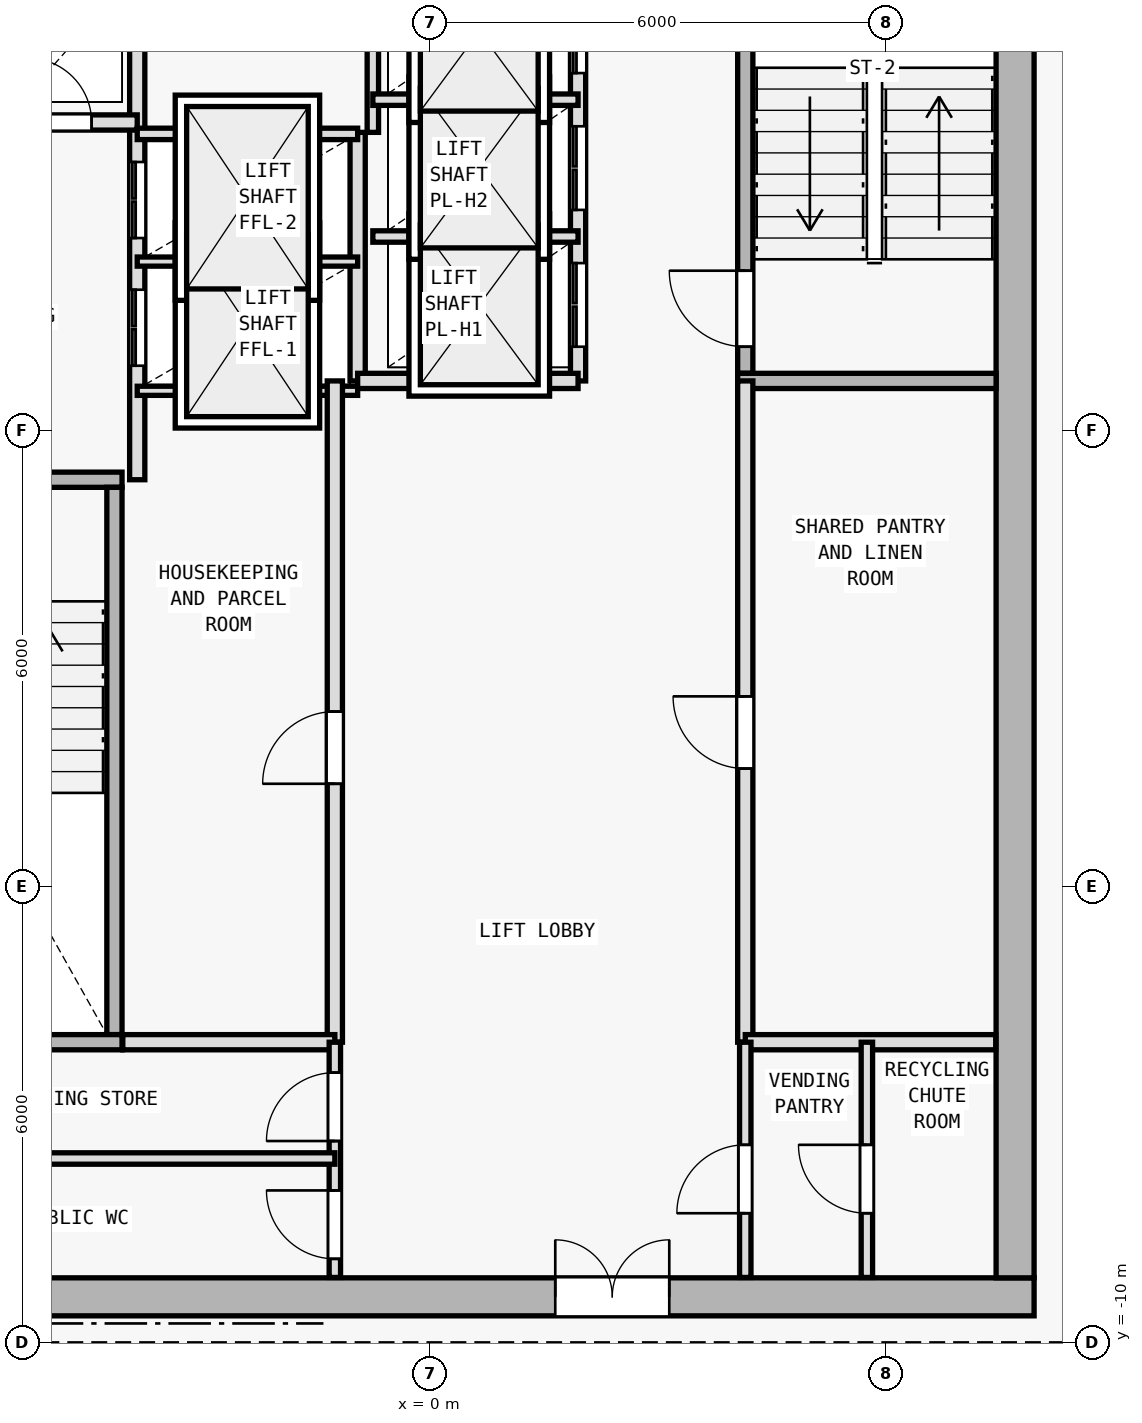
"""IFC4 building model, lengths in metres.
Left out: names, types, materials, properties, quantities, classifications, styles, units other than length and angle.
Written with IfcOpenShell. Run it as: python <this file> out.ifc"""

import sys

from ifc_helpers import new_model, si_unit, direction, frame, frame_2d, origin, origin_2d, place, context, subcontext, project, spatial, rectangle, i_section, extrude, element, fill, save


model = new_model("IFC4")
c1 = context("Model", 3, precision=1e-05, world=origin(), true_north=direction((0.0, 1.0)))
c2 = subcontext(c1, "Body", "Model", "MODEL_VIEW")
j1 = project(units=[si_unit("LENGTHUNIT", "METRE"), si_unit("PLANEANGLEUNIT", "RADIAN")], contexts=[c1])
p1 = place(None, origin())
s1 = spatial("IfcSite", under=j1, at=p1, CompositionType="ELEMENT")
p2 = place(p1, origin())
s2 = spatial("IfcBuilding", under=s1, at=p2, CompositionType="ELEMENT")
p3 = place(p2, frame((0.0, 0.0, 234.3)))
s3 = spatial("IfcBuildingStorey", under=s2, at=p3, CompositionType="ELEMENT", Elevation=234.3)
for number, where, z_axis, x_axis in (
    (1, (7.7, -9.4, 0.0), (0.0, 0.0, 1.0), (1.0, 0.0, 0.0)),
    (2, (0.0, -9.4, 0.0), (0.0, 0.0, 1.0), (1.0, 0.0, 0.0)),
    (3, (7.7, 0.4, 0.0), (0.0, 0.0, 1.0), (1.0, 0.0, 0.0)),
):
    element("IfcColumn", number, at=place(p3, frame(where, z_axis=z_axis, x_axis=x_axis)), inside=s3, PredefinedType="COLUMN", context=c2, shape_type="SweptSolid", body=[
        extrude(i_section(OverallWidth=0.398, OverallDepth=0.387, WebThickness=0.013, FlangeThickness=0.022, FilletRadius=0.015, at=origin_2d()), origin(), (0.0, 0.0, 1.0), 3.6),
    ])
p4 = place(p3, frame((-7.95, -9.4, 0.0), z_axis=(0.0, 0.0, 1.0), x_axis=(1.0, 0.0, 0.0)))
e4 = element("IfcWall", 4, at=p4, inside=s3, PredefinedType="SHEAR", context=c2, shape_type="SweptSolid", body=[
    extrude(rectangle(XDim=15.9, YDim=0.5, at=frame_2d((7.95, 0.0))), origin(), (0.0, 0.0, 1.0), 3.35),
])
p5 = place(p4, frame((9.6, 0.0, 0.0)))
e5 = element("IfcOpeningElement", 5, at=p5, cuts=e4, PredefinedType="OPENING", context=c2, shape_type="SweptSolid", body=[
    extrude(rectangle(XDim=1.5, YDim=2.2, at=frame_2d((0.75, 1.1))), frame((0.0, 0.26, 0.0), z_axis=(0.0, -1.0, 0.0), x_axis=(1.0, 0.0, 0.0)), (0.0, 0.0, 1.0), 0.52),
])
p6 = place(p3, frame((7.7, 9.95, 0.0), z_axis=(0.0, 0.0, 1.0), x_axis=(0.0, -1.0, 0.0)))
e6 = element("IfcWall", 6, at=p6, inside=s3, PredefinedType="SHEAR", context=c2, shape_type="SweptSolid", body=[
    extrude(rectangle(XDim=19.1, YDim=0.5, at=frame_2d((9.55, 0.0))), origin(), (0.0, 0.0, 1.0), 3.35),
])
p7 = place(p3, frame((-7.45, 1.35, 0.0), z_axis=(0.0, 0.0, 1.0), x_axis=(1.0, 0.0, 0.0)))
e7 = element("IfcWall", 7, at=p7, inside=s3, PredefinedType="SOLIDWALL", context=c2, shape_type="SweptSolid", body=[
    extrude(rectangle(XDim=3.4, YDim=0.2, at=frame_2d((1.7, 0.0))), origin(), (0.0, 0.0, 1.0), 3.35),
])
p8 = place(p7, frame((0.65, 0.0, 0.0)))
e8 = element("IfcOpeningElement", 8, at=p8, cuts=e7, PredefinedType="OPENING", context=c2, shape_type="SweptSolid", body=[
    extrude(rectangle(XDim=1.0, YDim=2.15, at=frame_2d((0.5, 1.075))), frame((0.0, 0.11, 0.0), z_axis=(0.0, -1.0, 0.0), x_axis=(1.0, 0.0, 0.0)), (0.0, 0.0, 1.0), 0.22),
])
p9 = place(p3, frame((-4.15, -5.95, 0.0), z_axis=(0.0, 0.0, 1.0), x_axis=(0.0, 1.0, 0.0)))
e9 = element("IfcWall", 9, at=p9, inside=s3, PredefinedType="SOLIDWALL", context=c2, shape_type="SweptSolid", body=[
    extrude(rectangle(XDim=7.2, YDim=0.2, at=frame_2d((3.6, 0.0))), origin(), (0.0, 0.0, 1.0), 3.35),
])
p10 = place(p3, frame((-3.85, 1.35, 0.0), z_axis=(0.0, 0.0, 1.0), x_axis=(0.0, 1.0, 0.0)))
e10 = element("IfcWall", 10, at=p10, inside=s3, PredefinedType="SOLIDWALL", context=c2, shape_type="SweptSolid", body=[
    extrude(rectangle(XDim=8.595, YDim=0.2, at=frame_2d((4.297, 0.0))), origin(), (0.0, 0.0, 1.0), 3.35),
])
p11 = place(p10, frame((1.5, 0.0, 0.0)))
e11 = element("IfcOpeningElement", 11, at=p11, cuts=e10, PredefinedType="OPENING", context=c2, shape_type="SweptSolid", body=[
    extrude(rectangle(XDim=1.0, YDim=2.15, at=frame_2d((0.5, 1.075))), frame((0.0, 0.11, 0.0), z_axis=(0.0, -1.0, 0.0), x_axis=(1.0, 0.0, 0.0)), (0.0, 0.0, 1.0), 0.22),
])
p12 = place(p10, frame((3.18, 0.0, 0.0)))
e12 = element("IfcOpeningElement", 12, at=p12, cuts=e10, PredefinedType="OPENING", context=c2, shape_type="SweptSolid", body=[
    extrude(rectangle(XDim=1.0, YDim=2.15, at=frame_2d((0.5, 1.075))), frame((0.0, 0.11, 0.0), z_axis=(0.0, -1.0, 0.0), x_axis=(1.0, 0.0, 0.0)), (0.0, 0.0, 1.0), 0.22),
])
p13 = place(p3, frame((-7.445, 6.05, 0.0), z_axis=(0.0, 0.0, 1.0), x_axis=(1.0, 0.0, 0.0)))
e13 = element("IfcWall", 13, at=p13, inside=s3, PredefinedType="SOLIDWALL", context=c2, shape_type="SweptSolid", body=[
    extrude(rectangle(XDim=3.595, YDim=0.2, at=frame_2d((1.797, 0.0))), origin(), (0.0, 0.0, 1.0), 3.35),
])
p14 = place(p13, frame((0.345, 0.0, 0.0)))
e14 = element("IfcOpeningElement", 14, at=p14, cuts=e13, PredefinedType="OPENING", context=c2, shape_type="SweptSolid", body=[
    extrude(rectangle(XDim=0.85, YDim=2.1, at=frame_2d((0.425, 1.05))), frame((0.0, 0.11, 0.0), z_axis=(0.0, -1.0, 0.0), x_axis=(1.0, 0.0, 0.0)), (0.0, 0.0, 1.0), 0.22),
])
p15 = place(p13, frame((2.145, 0.0, 0.0)))
e15 = element("IfcOpeningElement", 15, at=p15, cuts=e13, PredefinedType="OPENING", context=c2, shape_type="SweptSolid", body=[
    extrude(rectangle(XDim=0.85, YDim=2.1, at=frame_2d((0.425, 1.05))), frame((0.0, 0.11, 0.0), z_axis=(0.0, -1.0, 0.0), x_axis=(1.0, 0.0, 0.0)), (0.0, 0.0, 1.0), 0.22),
])
p16 = place(p3, frame((4.15, 2.75, 0.0), z_axis=(0.0, 0.0, 1.0), x_axis=(0.0, 1.0, 0.0)))
e16 = element("IfcWall", 16, at=p16, inside=s3, PredefinedType="SOLIDWALL", context=c2, shape_type="SweptSolid", body=[
    extrude(rectangle(XDim=7.2, YDim=0.2, at=frame_2d((3.6, 0.0))), origin(), (0.0, 0.0, 1.0), 3.35),
])
p17 = place(p16, frame((0.35, 0.0, 0.0)))
e17 = element("IfcOpeningElement", 17, at=p17, cuts=e16, PredefinedType="OPENING", context=c2, shape_type="SweptSolid", body=[
    extrude(rectangle(XDim=1.0, YDim=2.15, at=frame_2d((0.5, 1.075))), frame((0.0, 0.11, 0.0), z_axis=(0.0, -1.0, 0.0), x_axis=(1.0, 0.0, 0.0)), (0.0, 0.0, 1.0), 0.22),
])
p18 = place(p3, frame((4.05, 2.65, 0.0), z_axis=(0.0, 0.0, 1.0), x_axis=(1.0, 0.0, 0.0)))
e18 = element("IfcWall", 18, at=p18, inside=s3, PredefinedType="SOLIDWALL", context=c2, shape_type="SweptSolid", body=[
    extrude(rectangle(XDim=3.4, YDim=0.2, at=frame_2d((1.7, 0.0))), origin(), (0.0, 0.0, 1.0), 3.35),
])
p19 = place(p3, frame((-0.95, 2.65, 0.0), z_axis=(0.0, 0.0, 1.0), x_axis=(0.0, 1.0, 0.0)))
e19 = element("IfcWall", 19, at=p19, inside=s3, PredefinedType="SOLIDWALL", context=c2, shape_type="SweptSolid", body=[
    extrude(rectangle(XDim=3.27, YDim=0.2, at=frame_2d((1.635, 0.0))), origin(), (0.0, 0.0, 1.0), 3.35),
])
for number, where, z_axis, x_axis in (
    (20, (-3.85, 2.52, 0.0), (0.0, 0.0, 1.0), (1.0, 0.0, 0.0)),
    (21, (-3.85, 4.22, 0.0), (0.0, 0.0, 1.0), (1.0, 0.0, 0.0)),
):
    element("IfcWall", number, at=place(p3, frame(where, z_axis=z_axis, x_axis=x_axis)), inside=s3, PredefinedType="PARTITIONING", context=c2, shape_type="SweptSolid", body=[
        extrude(rectangle(XDim=2.9, YDim=0.12, at=frame_2d((1.45, 0.0))), origin(), (0.0, 0.0, 1.0), 3.35),
    ])
p20 = place(p3, frame((-3.85, 5.9, 0.0), z_axis=(0.0, 0.0, 1.0), x_axis=(1.0, 0.0, 0.0)))
e22 = element("IfcWall", 22, at=p20, inside=s3, PredefinedType="PARTITIONING", context=c2, shape_type="SweptSolid", body=[
    extrude(rectangle(XDim=2.9, YDim=0.15, at=frame_2d((1.45, 0.0))), origin(), (0.0, 0.0, 1.0), 3.35),
])
p21 = place(p3, frame((4.15, -6.05, 0.0), z_axis=(0.0, 0.0, 1.0), x_axis=(0.0, 1.0, 0.0)))
e23 = element("IfcWall", 23, at=p21, inside=s3, PredefinedType="SOLIDWALL", context=c2, shape_type="SweptSolid", body=[
    extrude(rectangle(XDim=8.7, YDim=0.2, at=frame_2d((4.35, 0.0))), origin(), (0.0, 0.0, 1.0), 3.35),
])
p22 = place(p21, frame((3.6, 0.0, 0.0)))
e24 = element("IfcOpeningElement", 24, at=p22, cuts=e23, PredefinedType="OPENING", context=c2, shape_type="SweptSolid", body=[
    extrude(rectangle(XDim=0.95, YDim=2.1, at=frame_2d((0.475, 1.05))), frame((0.0, 0.11, 0.0), z_axis=(0.0, -1.0, 0.0), x_axis=(1.0, 0.0, 0.0)), (0.0, 0.0, 1.0), 0.22),
])
p23 = place(p3, frame((-1.25, -6.05, 0.0), z_axis=(0.0, 0.0, 1.0), x_axis=(0.0, 1.0, 0.0)))
e25 = element("IfcWall", 25, at=p23, inside=s3, PredefinedType="SOLIDWALL", context=c2, shape_type="SweptSolid", body=[
    extrude(rectangle(XDim=8.7, YDim=0.2, at=frame_2d((4.35, 0.0))), origin(), (0.0, 0.0, 1.0), 3.35),
])
p24 = place(p23, frame((3.4, 0.0, 0.0)))
e26 = element("IfcOpeningElement", 26, at=p24, cuts=e25, PredefinedType="OPENING", context=c2, shape_type="SweptSolid", body=[
    extrude(rectangle(XDim=0.95, YDim=2.1, at=frame_2d((0.475, 1.05))), frame((0.0, 0.11, 0.0), z_axis=(0.0, -1.0, 0.0), x_axis=(1.0, 0.0, 0.0)), (0.0, 0.0, 1.0), 0.22),
])
p25 = place(p3, frame((1.95, 2.65, 0.0), z_axis=(0.0, 0.0, 1.0), x_axis=(0.0, 1.0, 0.0)))
e27 = element("IfcWall", 27, at=p25, inside=s3, PredefinedType="SOLIDWALL", context=c2, shape_type="SweptSolid", body=[
    extrude(rectangle(XDim=7.295, YDim=0.2, at=frame_2d((3.647, 0.0))), origin(), (0.0, 0.0, 1.0), 3.35),
])
p26 = place(p25, frame((0.45, 0.0, 0.0)))
e28 = element("IfcOpeningElement", 28, at=p26, cuts=e27, PredefinedType="OPENING", context=c2, shape_type="SweptSolid", body=[
    extrude(rectangle(XDim=1.1, YDim=2.15, at=frame_2d((0.55, 1.075))), frame((0.0, 0.11, 0.0), z_axis=(0.0, -1.0, 0.0), x_axis=(1.0, 0.0, 0.0)), (0.0, 0.0, 1.0), 0.22),
])
p27 = place(p25, frame((2.25, 0.0, 0.0)))
e29 = element("IfcOpeningElement", 29, at=p27, cuts=e27, PredefinedType="OPENING", context=c2, shape_type="SweptSolid", body=[
    extrude(rectangle(XDim=1.1, YDim=2.15, at=frame_2d((0.55, 1.075))), frame((0.0, 0.11, 0.0), z_axis=(0.0, -1.0, 0.0), x_axis=(1.0, 0.0, 0.0)), (0.0, 0.0, 1.0), 0.22),
])
p28 = place(p25, frame((4.05, 0.0, 0.0)))
e30 = element("IfcOpeningElement", 30, at=p28, cuts=e27, PredefinedType="OPENING", context=c2, shape_type="SweptSolid", body=[
    extrude(rectangle(XDim=1.1, YDim=2.15, at=frame_2d((0.55, 1.075))), frame((0.0, 0.11, 0.0), z_axis=(0.0, -1.0, 0.0), x_axis=(1.0, 0.0, 0.0)), (0.0, 0.0, 1.0), 0.22),
])
p29 = place(p25, frame((5.85, 0.0, 0.0)))
e31 = element("IfcOpeningElement", 31, at=p29, cuts=e27, PredefinedType="OPENING", context=c2, shape_type="SweptSolid", body=[
    extrude(rectangle(XDim=1.1, YDim=2.15, at=frame_2d((0.55, 1.075))), frame((0.0, 0.11, 0.0), z_axis=(0.0, -1.0, 0.0), x_axis=(1.0, 0.0, 0.0)), (0.0, 0.0, 1.0), 0.22),
])
p30 = place(p3, frame((-0.95, 2.65, 0.0), z_axis=(0.0, 0.0, 1.0), x_axis=(1.0, 0.0, 0.0)))
e32 = element("IfcWall", 32, at=p30, inside=s3, PredefinedType="SOLIDWALL", context=c2, shape_type="SweptSolid", body=[
    extrude(rectangle(XDim=2.9, YDim=0.2, at=frame_2d((1.45, 0.0))), origin(), (0.0, 0.0, 1.0), 3.35),
])
p31 = place(p3, frame((-0.75, 5.92, 0.0), z_axis=(0.0, 0.0, 1.0), x_axis=(0.0, 1.0, 0.0)))
e33 = element("IfcWall", 33, at=p31, inside=s3, PredefinedType="PARTITIONING", context=c2, shape_type="SweptSolid", body=[
    extrude(rectangle(XDim=4.025, YDim=0.15, at=frame_2d((2.013, 0.0))), origin(), (0.0, 0.0, 1.0), 3.35),
])
for number, where, z_axis, x_axis in (
    (34, (-0.75, 4.55, 0.0), (0.0, 0.0, 1.0), (1.0, 0.0, 0.0)),
    (35, (-0.75, 6.35, 0.0), (0.0, 0.0, 1.0), (1.0, 0.0, 0.0)),
):
    element("IfcWall", number, at=place(p3, frame(where, z_axis=z_axis, x_axis=x_axis)), inside=s3, PredefinedType="PARTITIONING", context=c2, shape_type="SweptSolid", body=[
        extrude(rectangle(XDim=2.7, YDim=0.15, at=frame_2d((1.35, 0.0))), origin(), (0.0, 0.0, 1.0), 3.35),
    ])
p32 = place(p3, frame((-7.45, -6.05, 0.0), z_axis=(0.0, 0.0, 1.0), x_axis=(1.0, 0.0, 0.0)))
e36 = element("IfcWall", 36, at=p32, inside=s3, PredefinedType="SOLIDWALL", context=c2, shape_type="SweptSolid", body=[
    extrude(rectangle(XDim=3.4, YDim=0.2, at=frame_2d((1.7, 0.0))), origin(), (0.0, 0.0, 1.0), 3.35),
])
p33 = place(p3, frame((-4.04, -6.05, 0.0), z_axis=(0.0, 0.0, 1.0), x_axis=(1.0, 0.0, 0.0)))
e37 = element("IfcWall", 37, at=p33, inside=s3, PredefinedType="SOLIDWALL", context=c2, shape_type="SweptSolid", body=[
    extrude(rectangle(XDim=2.79, YDim=0.2, at=frame_2d((1.395, 0.0))), origin(), (0.0, 0.0, 1.0), 3.35),
])
p34 = place(p3, frame((4.15, -6.05, 0.0), z_axis=(0.0, 0.0, 1.0), x_axis=(1.0, 0.0, 0.0)))
e38 = element("IfcWall", 38, at=p34, inside=s3, PredefinedType="SOLIDWALL", context=c2, shape_type="SweptSolid", body=[
    extrude(rectangle(XDim=3.295, YDim=0.2, at=frame_2d((1.647, 0.0))), origin(), (0.0, 0.0, 1.0), 3.35),
])
p35 = place(p3, frame((-1.25, -9.145, 0.0), z_axis=(0.0, 0.0, 1.0), x_axis=(0.0, 1.0, 0.0)))
e39 = element("IfcWall", 39, at=p35, inside=s3, PredefinedType="PARTITIONING", context=c2, shape_type="SweptSolid", body=[
    extrude(rectangle(XDim=3.095, YDim=0.15, at=frame_2d((1.547, 0.0))), origin(), (0.0, 0.0, 1.0), 3.35),
])
p36 = place(p35, frame((1.795, 0.0, 0.0)))
e40 = element("IfcOpeningElement", 40, at=p36, cuts=e39, PredefinedType="OPENING", context=c2, shape_type="SweptSolid", body=[
    extrude(rectangle(XDim=0.9, YDim=2.1, at=frame_2d((0.45, 1.05))), frame((0.0, 0.085, 0.0), z_axis=(0.0, -1.0, 0.0), x_axis=(1.0, 0.0, 0.0)), (0.0, 0.0, 1.0), 0.17),
])
p37 = place(p35, frame((0.245, 0.0, 0.0)))
e41 = element("IfcOpeningElement", 41, at=p37, cuts=e39, PredefinedType="OPENING", context=c2, shape_type="SweptSolid", body=[
    extrude(rectangle(XDim=0.9, YDim=2.1, at=frame_2d((0.45, 1.05))), frame((0.0, 0.085, 0.0), z_axis=(0.0, -1.0, 0.0), x_axis=(1.0, 0.0, 0.0)), (0.0, 0.0, 1.0), 0.17),
])
p38 = place(p3, frame((4.15, -9.145, 0.0), z_axis=(0.0, 0.0, 1.0), x_axis=(0.0, 1.0, 0.0)))
e42 = element("IfcWall", 42, at=p38, inside=s3, PredefinedType="PARTITIONING", context=c2, shape_type="SweptSolid", body=[
    extrude(rectangle(XDim=3.095, YDim=0.15, at=frame_2d((1.547, 0.0))), origin(), (0.0, 0.0, 1.0), 3.35),
])
p39 = place(p38, frame((0.845, 0.0, 0.0)))
e43 = element("IfcOpeningElement", 43, at=p39, cuts=e42, PredefinedType="OPENING", context=c2, shape_type="SweptSolid", body=[
    extrude(rectangle(XDim=0.9, YDim=2.1, at=frame_2d((0.45, 1.05))), frame((0.0, 0.085, 0.0), z_axis=(0.0, -1.0, 0.0), x_axis=(1.0, 0.0, 0.0)), (0.0, 0.0, 1.0), 0.17),
])
p40 = place(p3, frame((-7.445, -7.58, 0.0), z_axis=(0.0, 0.0, 1.0), x_axis=(1.0, 0.0, 0.0)))
e44 = element("IfcWall", 44, at=p40, inside=s3, PredefinedType="PARTITIONING", context=c2, shape_type="SweptSolid", body=[
    extrude(rectangle(XDim=6.195, YDim=0.15, at=frame_2d((3.098, 0.0))), origin(), (0.0, 0.0, 1.0), 3.35),
])
p41 = place(p3, frame((5.75, -9.145, 0.0), z_axis=(0.0, 0.0, 1.0), x_axis=(0.0, 1.0, 0.0)))
e45 = element("IfcWall", 45, at=p41, inside=s3, PredefinedType="PARTITIONING", context=c2, shape_type="SweptSolid", body=[
    extrude(rectangle(XDim=3.095, YDim=0.15, at=frame_2d((1.547, 0.0))), origin(), (0.0, 0.0, 1.0), 3.35),
])
p42 = place(p41, frame((0.845, 0.0, 0.0)))
e46 = element("IfcOpeningElement", 46, at=p42, cuts=e45, PredefinedType="OPENING", context=c2, shape_type="SweptSolid", body=[
    extrude(rectangle(XDim=0.9, YDim=2.1, at=frame_2d((0.45, 1.05))), frame((0.0, 0.085, 0.0), z_axis=(0.0, -1.0, 0.0), x_axis=(1.0, 0.0, 0.0)), (0.0, 0.0, 1.0), 0.17),
])
p43 = place(p5, origin())
e47 = element("IfcDoor", 47, at=p43, inside=s3, OperationType="DOUBLE_DOOR_SINGLE_SWING", PredefinedType="DOOR", context=c2, shape_type="SweptSolid", body=[
    extrude(rectangle(XDim=1.5, YDim=2.2, at=frame_2d((0.75, 1.1))), frame((0.0, 0.025, 0.0), z_axis=(0.0, -1.0, 0.0), x_axis=(1.0, 0.0, 0.0)), (0.0, 0.0, 1.0), 0.05),
])
fill(e5, e47)
p44 = place(p15, origin())
e48 = element("IfcDoor", 48, at=p44, inside=s3, OperationType="SINGLE_SWING_LEFT", PredefinedType="DOOR", context=c2, shape_type="SweptSolid", body=[
    extrude(rectangle(XDim=0.85, YDim=2.1, at=frame_2d((0.425, 1.05))), frame((0.0, 0.025, 0.0), z_axis=(0.0, -1.0, 0.0), x_axis=(1.0, 0.0, 0.0)), (0.0, 0.0, 1.0), 0.05),
])
fill(e15, e48)
p45 = place(p17, origin())
e49 = element("IfcDoor", 49, at=p45, inside=s3, OperationType="SINGLE_SWING_RIGHT", PredefinedType="DOOR", context=c2, shape_type="SweptSolid", body=[
    extrude(rectangle(XDim=1.0, YDim=2.15, at=frame_2d((0.5, 1.075))), frame((0.0, 0.025, 0.0), z_axis=(0.0, -1.0, 0.0), x_axis=(1.0, 0.0, 0.0)), (0.0, 0.0, 1.0), 0.05),
])
fill(e17, e49)
p46 = place(p22, origin())
e50 = element("IfcDoor", 50, at=p46, inside=s3, OperationType="SINGLE_SWING_RIGHT", PredefinedType="DOOR", context=c2, shape_type="SweptSolid", body=[
    extrude(rectangle(XDim=0.95, YDim=2.1, at=frame_2d((0.475, 1.05))), frame((0.0, 0.025, 0.0), z_axis=(0.0, -1.0, 0.0), x_axis=(1.0, 0.0, 0.0)), (0.0, 0.0, 1.0), 0.05),
])
fill(e24, e50)
p47 = place(p24, origin())
e51 = element("IfcDoor", 51, at=p47, inside=s3, OperationType="SINGLE_SWING_LEFT", PredefinedType="DOOR", context=c2, shape_type="SweptSolid", body=[
    extrude(rectangle(XDim=0.95, YDim=2.1, at=frame_2d((0.475, 1.05))), frame((0.0, 0.025, 0.0), z_axis=(0.0, -1.0, 0.0), x_axis=(1.0, 0.0, 0.0)), (0.0, 0.0, 1.0), 0.05),
])
fill(e26, e51)
p48 = place(p26, origin())
e52 = element("IfcDoor", 52, at=p48, inside=s3, OperationType="DOUBLE_DOOR_SLIDING", PredefinedType="DOOR", context=c2, shape_type="SweptSolid", body=[
    extrude(rectangle(XDim=1.1, YDim=2.15, at=frame_2d((0.55, 1.075))), frame((0.0, 0.025, 0.0), z_axis=(0.0, -1.0, 0.0), x_axis=(1.0, 0.0, 0.0)), (0.0, 0.0, 1.0), 0.05),
])
fill(e28, e52)
p49 = place(p27, origin())
e53 = element("IfcDoor", 53, at=p49, inside=s3, OperationType="DOUBLE_DOOR_SLIDING", PredefinedType="DOOR", context=c2, shape_type="SweptSolid", body=[
    extrude(rectangle(XDim=1.1, YDim=2.15, at=frame_2d((0.55, 1.075))), frame((0.0, 0.025, 0.0), z_axis=(0.0, -1.0, 0.0), x_axis=(1.0, 0.0, 0.0)), (0.0, 0.0, 1.0), 0.05),
])
fill(e29, e53)
p50 = place(p28, origin())
e54 = element("IfcDoor", 54, at=p50, inside=s3, OperationType="DOUBLE_DOOR_SLIDING", PredefinedType="DOOR", context=c2, shape_type="SweptSolid", body=[
    extrude(rectangle(XDim=1.1, YDim=2.15, at=frame_2d((0.55, 1.075))), frame((0.0, 0.025, 0.0), z_axis=(0.0, -1.0, 0.0), x_axis=(1.0, 0.0, 0.0)), (0.0, 0.0, 1.0), 0.05),
])
fill(e30, e54)
p51 = place(p11, origin())
e55 = element("IfcDoor", 55, at=p51, inside=s3, OperationType="DOUBLE_DOOR_SLIDING", PredefinedType="DOOR", context=c2, shape_type="SweptSolid", body=[
    extrude(rectangle(XDim=1.0, YDim=2.15, at=frame_2d((0.5, 1.075))), frame((0.0, 0.025, 0.0), z_axis=(0.0, -1.0, 0.0), x_axis=(1.0, 0.0, 0.0)), (0.0, 0.0, 1.0), 0.05),
])
fill(e11, e55)
p52 = place(p12, origin())
e56 = element("IfcDoor", 56, at=p52, inside=s3, OperationType="DOUBLE_DOOR_SLIDING", PredefinedType="DOOR", context=c2, shape_type="SweptSolid", body=[
    extrude(rectangle(XDim=1.0, YDim=2.15, at=frame_2d((0.5, 1.075))), frame((0.0, 0.025, 0.0), z_axis=(0.0, -1.0, 0.0), x_axis=(1.0, 0.0, 0.0)), (0.0, 0.0, 1.0), 0.05),
])
fill(e12, e56)
p53 = place(p36, origin())
e57 = element("IfcDoor", 57, at=p53, inside=s3, OperationType="SINGLE_SWING_LEFT", PredefinedType="DOOR", context=c2, shape_type="SweptSolid", body=[
    extrude(rectangle(XDim=0.9, YDim=2.1, at=frame_2d((0.45, 1.05))), frame((0.0, 0.025, 0.0), z_axis=(0.0, -1.0, 0.0), x_axis=(1.0, 0.0, 0.0)), (0.0, 0.0, 1.0), 0.05),
])
fill(e40, e57)
p54 = place(p37, origin())
e58 = element("IfcDoor", 58, at=p54, inside=s3, OperationType="SINGLE_SWING_RIGHT", PredefinedType="DOOR", context=c2, shape_type="SweptSolid", body=[
    extrude(rectangle(XDim=0.9, YDim=2.1, at=frame_2d((0.45, 1.05))), frame((0.0, 0.025, 0.0), z_axis=(0.0, -1.0, 0.0), x_axis=(1.0, 0.0, 0.0)), (0.0, 0.0, 1.0), 0.05),
])
fill(e41, e58)
p55 = place(p39, origin())
e59 = element("IfcDoor", 59, at=p55, inside=s3, OperationType="SINGLE_SWING_LEFT", PredefinedType="DOOR", context=c2, shape_type="SweptSolid", body=[
    extrude(rectangle(XDim=0.9, YDim=2.1, at=frame_2d((0.45, 1.05))), frame((0.0, 0.025, 0.0), z_axis=(0.0, -1.0, 0.0), x_axis=(1.0, 0.0, 0.0)), (0.0, 0.0, 1.0), 0.05),
])
fill(e43, e59)
p56 = place(p42, origin())
e60 = element("IfcDoor", 60, at=p56, inside=s3, OperationType="SINGLE_SWING_RIGHT", PredefinedType="DOOR", context=c2, shape_type="SweptSolid", body=[
    extrude(rectangle(XDim=0.9, YDim=2.1, at=frame_2d((0.45, 1.05))), frame((0.0, 0.025, 0.0), z_axis=(0.0, -1.0, 0.0), x_axis=(1.0, 0.0, 0.0)), (0.0, 0.0, 1.0), 0.05),
])
fill(e46, e60)
save(model, sys.argv[1])
